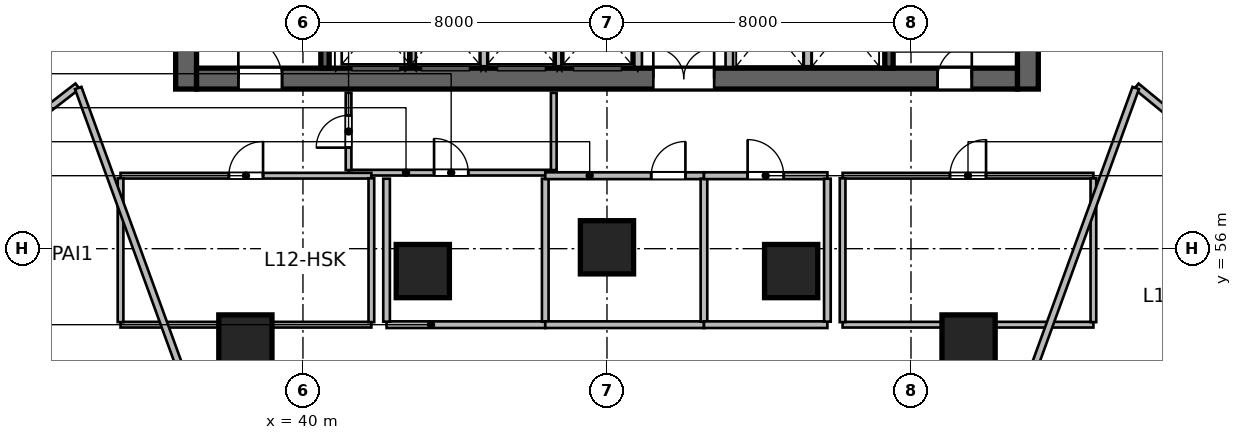
"""IFC4 building model, lengths in metres.
Left out: names, types, materials, properties, quantities, classifications, styles, units other than length and angle.
Written with IfcOpenShell. Run it as: python <this file> out.ifc"""

import sys

from ifc_helpers import new_model, si_unit, direction, frame, frame_2d, origin, origin_2d, place, context, subcontext, project, spatial, rectangle, circle, extrude, source, transform, mapped, element, fill, save


model = new_model("IFC4")
c1 = context("Model", 3, precision=1e-05, world=origin(), true_north=direction((0.0, 1.0)))
c2 = subcontext(c1, "Body", "Model", "MODEL_VIEW")
j1 = project(units=[si_unit("LENGTHUNIT", "METRE"), si_unit("PLANEANGLEUNIT", "RADIAN")], contexts=[c1])
p1 = place(None, origin())
s1 = spatial("IfcSite", under=j1, at=p1, CompositionType="ELEMENT")
p2 = place(p1, origin())
s2 = spatial("IfcBuilding", under=s1, at=p2, CompositionType="ELEMENT")
p3 = place(p2, frame((0.0, 0.0, 57.0)))
s3 = spatial("IfcBuildingStorey", under=s2, at=p3, CompositionType="ELEMENT", Elevation=57.0)
m1 = source(origin(), c2, "Body", "SweptSolid", [
    extrude(rectangle(XDim=12.0, YDim=0.55, at=frame_2d((6.0, 0.0))), origin(), (0.0, 0.0, 1.0), 3.6),
])
for number, where, z_axis, x_axis in (
    (1, (36.925, 60.2, 0.0), (0.0, 0.0, 1.0), (0.0, 1.0, 0.0)),
    (2, (59.075, 60.2, 0.0), (0.0, 0.0, 1.0), (0.0, 1.0, 0.0)),
):
    element("IfcWall", number, at=place(p3, frame(where, z_axis=z_axis, x_axis=x_axis)), inside=s3, PredefinedType="SHEAR", context=c2, shape_type="MappedRepresentation", body=[
        mapped(m1, transform((0.0, 0.0, 0.0), scale=1.0)),
    ])
m2 = source(origin(), c2, "Body", "SweptSolid", [
    extrude(rectangle(XDim=21.6, YDim=0.55, at=frame_2d((10.8, 0.0))), origin(), (0.0, 0.0, 1.0), 3.6),
])
p4 = place(p3, frame((37.2, 60.475, 0.0), z_axis=(0.0, 0.0, 1.0), x_axis=(1.0, 0.0, 0.0)))
e3 = element("IfcWall", 3, at=p4, inside=s3, PredefinedType="SHEAR", context=c2, shape_type="MappedRepresentation", body=[
    mapped(m2, transform((0.0, 0.0, 0.0), scale=1.0)),
])
p5 = place(p4, frame((1.1, 0.0, 0.0)))
e4 = element("IfcOpeningElement", 4, at=p5, cuts=e3, PredefinedType="OPENING", context=c2, shape_type="SweptSolid", body=[
    extrude(rectangle(XDim=1.15, YDim=2.15, at=frame_2d((0.575, 1.075))), frame((0.0, 0.285, 0.0), z_axis=(0.0, -1.0, 0.0), x_axis=(1.0, 0.0, 0.0)), (0.0, 0.0, 1.0), 0.57),
])
p6 = place(p4, frame((19.5, 0.0, 0.0)))
e5 = element("IfcOpeningElement", 5, at=p6, cuts=e3, PredefinedType="OPENING", context=c2, shape_type="SweptSolid", body=[
    extrude(rectangle(XDim=0.9, YDim=2.1, at=frame_2d((0.45, 1.05))), frame((0.0, 0.285, 0.0), z_axis=(0.0, -1.0, 0.0), x_axis=(1.0, 0.0, 0.0)), (0.0, 0.0, 1.0), 0.57),
])
p7 = place(p4, frame((12.02, 0.0, 0.0)))
e6 = element("IfcOpeningElement", 6, at=p7, cuts=e3, PredefinedType="OPENING", context=c2, shape_type="SweptSolid", body=[
    extrude(rectangle(XDim=1.6, YDim=2.15, at=frame_2d((0.8, 1.075))), frame((0.0, 0.285, 0.0), z_axis=(0.0, -1.0, 0.0), x_axis=(1.0, 0.0, 0.0)), (0.0, 0.0, 1.0), 0.57),
])
m3 = source(origin(), c2, "Body", "SweptSolid", [
    extrude(rectangle(XDim=10.9, YDim=0.22, at=frame_2d((5.45, 0.0))), origin(), (0.0, 0.0, 1.0), 3.6),
])
p8 = place(p3, frame((40.58, 60.75, 0.0), z_axis=(0.0, 0.0, 1.0), x_axis=(0.0, 1.0, 0.0)))
e7 = element("IfcWall", 7, at=p8, inside=s3, PredefinedType="SHEAR", context=c2, shape_type="MappedRepresentation", body=[
    mapped(m3, transform((0.0, 0.0, 0.0), scale=1.0)),
])
p9 = place(p3, frame((55.42, 60.75, 0.0), z_axis=(0.0, 0.0, 1.0), x_axis=(0.0, 1.0, 0.0)))
e8 = element("IfcWall", 8, at=p9, inside=s3, PredefinedType="SHEAR", context=c2, shape_type="MappedRepresentation", body=[
    mapped(m3, transform((0.0, 0.0, 0.0), scale=1.0)),
])
p10 = place(p9, frame((9.495, 0.0, 0.0)))
e9 = element("IfcOpeningElement", 9, at=p10, cuts=e8, PredefinedType="OPENING", context=c2, shape_type="SweptSolid", body=[
    extrude(rectangle(XDim=1.15, YDim=2.15, at=frame_2d((0.575, 1.075))), frame((0.0, 0.12, 0.0), z_axis=(0.0, -1.0, 0.0), x_axis=(1.0, 0.0, 0.0)), (0.0, 0.0, 1.0), 0.24),
])
m4 = source(origin(), c2, "Body", "SweptSolid", [
    extrude(circle(Radius=0.7, at=origin_2d()), origin(), (0.0, 0.0, 1.0), 3.6),
])
for number, where, z_axis, x_axis in (
    (10, (38.485, 53.558, 0.0), (0.0, 0.0, 1.0), (-0.289, 0.957, 0.0)),
    (11, (43.154, 55.411, 0.0), (0.0, 0.0, 1.0), (-0.143, 0.99, 0.0)),
    (12, (48.0, 56.036, 0.0), (0.0, 0.0, 1.0), (0.0, 1.0, 0.0)),
    (13, (52.846, 55.411, 0.0), (0.0, 0.0, 1.0), (0.143, 0.99, 0.0)),
    (14, (57.515, 53.558, 0.0), (0.0, 0.0, 1.0), (0.289, 0.957, 0.0)),
):
    element("IfcColumn", number, at=place(p3, frame(where, z_axis=z_axis, x_axis=x_axis)), inside=s3, PredefinedType="COLUMN", context=c2, shape_type="MappedRepresentation", body=[
        mapped(m4, transform((0.0, 0.0, 0.0), scale=1.0)),
    ])
m5 = source(origin(), c2, "Body", "SweptSolid", [
    extrude(rectangle(XDim=2.24, YDim=0.2, at=frame_2d((1.12, 0.0))), origin(), (0.0, 0.0, 1.0), 3.36),
])
for number, where, z_axis, x_axis in (
    (15, (48.82, 60.78, 0.0), (0.0, 0.0, 1.0), (0.0, 1.0, 0.0)),
    (16, (51.22, 60.78, 0.0), (0.0, 0.0, 1.0), (0.0, 1.0, 0.0)),
):
    element("IfcWall", number, at=place(p3, frame(where, z_axis=z_axis, x_axis=x_axis)), inside=s3, PredefinedType="SOLIDWALL", context=c2, shape_type="MappedRepresentation", body=[
        mapped(m5, transform((0.0, 0.0, 0.0), scale=1.0)),
    ])
m6 = source(origin(), c2, "Body", "SweptSolid", [
    extrude(rectangle(XDim=2.2, YDim=0.2, at=frame_2d((1.1, 0.0))), origin(), (0.0, 0.0, 1.0), 3.36),
])
for number, where, z_axis, x_axis in (
    (17, (42.87, 60.8, 0.0), (0.0, 0.0, 1.0), (0.0, 1.0, 0.0)),
    (18, (44.77, 60.8, 0.0), (0.0, 0.0, 1.0), (0.0, 1.0, 0.0)),
    (19, (46.7, 60.8, 0.0), (0.0, 0.0, 1.0), (0.0, 1.0, 0.0)),
    (20, (53.28, 60.8, 0.0), (0.0, 0.0, 1.0), (0.0, 1.0, 0.0)),
):
    element("IfcWall", number, at=place(p3, frame(where, z_axis=z_axis, x_axis=x_axis)), inside=s3, PredefinedType="SOLIDWALL", context=c2, shape_type="MappedRepresentation", body=[
        mapped(m6, transform((0.0, 0.0, 0.0), scale=1.0)),
    ])
m7 = source(origin(), c2, "Body", "SweptSolid", [
    extrude(rectangle(XDim=5.4, YDim=0.15, at=frame_2d((2.7, 0.0))), origin(), (0.0, 0.0, 1.0), 3.36),
])
p11 = place(p3, frame((41.2, 58.0, 0.0), z_axis=(0.0, 0.0, 1.0), x_axis=(1.0, 0.0, 0.0)))
e21 = element("IfcWall", 21, at=p11, inside=s3, PredefinedType="PARTITIONING", context=c2, shape_type="MappedRepresentation", body=[
    mapped(m7, transform((0.0, 0.0, 0.0), scale=1.0)),
])
p12 = place(p11, frame((2.25, 0.0, 0.0)))
e22 = element("IfcOpeningElement", 22, at=p12, cuts=e21, PredefinedType="OPENING", context=c2, shape_type="SweptSolid", body=[
    extrude(rectangle(XDim=0.9, YDim=2.08, at=frame_2d((0.45, 1.04))), frame((0.0, 0.085, 0.0), z_axis=(0.0, -1.0, 0.0), x_axis=(1.0, 0.0, 0.0)), (0.0, 0.0, 1.0), 0.17),
])
m8 = source(origin(), c2, "Body", "SweptSolid", [
    extrude(rectangle(XDim=2.033, YDim=0.15, at=frame_2d((1.016, 0.0))), origin(), (0.0, 0.0, 1.0), 3.36),
])
p13 = place(p3, frame((41.2, 58.067, 0.0), z_axis=(0.0, 0.0, 1.0), x_axis=(0.0, 1.0, 0.0)))
e23 = element("IfcWall", 23, at=p13, inside=s3, PredefinedType="PARTITIONING", context=c2, shape_type="MappedRepresentation", body=[
    mapped(m8, transform((0.0, 0.0, 0.0), scale=1.0)),
])
p14 = place(p13, frame((0.591, 0.0, 0.0)))
e24 = element("IfcOpeningElement", 24, at=p14, cuts=e23, PredefinedType="OPENING", context=c2, shape_type="SweptSolid", body=[
    extrude(rectangle(XDim=0.85, YDim=2.1, at=frame_2d((0.425, 1.05))), frame((0.0, 0.085, 0.0), z_axis=(0.0, -1.0, 0.0), x_axis=(1.0, 0.0, 0.0)), (0.0, 0.0, 1.0), 0.17),
])
p15 = place(p3, frame((46.6, 58.067, 0.0), z_axis=(0.0, 0.0, 1.0), x_axis=(0.0, 1.0, 0.0)))
e25 = element("IfcWall", 25, at=p15, inside=s3, PredefinedType="PARTITIONING", context=c2, shape_type="MappedRepresentation", body=[
    mapped(m8, transform((0.0, 0.0, 0.0), scale=1.0)),
])
m9 = source(origin(), c2, "Body", "SweptSolid", [
    extrude(rectangle(XDim=6.6, YDim=0.15, at=frame_2d((3.3, 0.0))), origin(), (0.0, 0.0, 1.0), 2.803),
])
p16 = place(p3, frame((35.2, 54.0, 0.0), z_axis=(0.0, 0.0, 1.0), x_axis=(1.0, 0.0, 0.0)))
e26 = element("IfcWall", 26, at=p16, inside=s3, PredefinedType="PARTITIONING", context=c2, shape_type="MappedRepresentation", body=[
    mapped(m9, transform((0.0, 0.0, 0.0), scale=1.0)),
])
m10 = source(origin(), c2, "Body", "SweptSolid", [
    extrude(rectangle(XDim=6.6, YDim=0.15, at=frame_2d((3.3, 0.0))), origin(), (0.0, 0.0, 1.0), 3.36),
])
p17 = place(p3, frame((35.2, 57.92, 0.0), z_axis=(0.0, 0.0, 1.0), x_axis=(1.0, 0.0, 0.0)))
e27 = element("IfcWall", 27, at=p17, inside=s3, PredefinedType="PARTITIONING", context=c2, shape_type="MappedRepresentation", body=[
    mapped(m10, transform((0.0, 0.0, 0.0), scale=1.0)),
])
p18 = place(p17, frame((2.85, 0.0, 0.0)))
e28 = element("IfcOpeningElement", 28, at=p18, cuts=e27, PredefinedType="OPENING", context=c2, shape_type="SweptSolid", body=[
    extrude(rectangle(XDim=0.9, YDim=2.1, at=frame_2d((0.45, 1.05))), frame((0.0, 0.085, 0.0), z_axis=(0.0, -1.0, 0.0), x_axis=(1.0, 0.0, 0.0)), (0.0, 0.0, 1.0), 0.17),
])
m11 = source(origin(), c2, "Body", "SweptSolid", [
    extrude(rectangle(XDim=3.785, YDim=0.15, at=frame_2d((1.893, 0.0))), origin(), (0.0, 0.0, 1.0), 3.36),
])
for number, where, z_axis, x_axis in (
    (29, (35.2, 54.067, 0.0), (0.0, 0.0, 1.0), (0.0, 1.0, 0.0)),
    (30, (41.8, 54.067, 0.0), (0.0, 0.0, 1.0), (0.0, 1.0, 0.0)),
):
    element("IfcWall", number, at=place(p3, frame(where, z_axis=z_axis, x_axis=x_axis)), inside=s3, PredefinedType="PARTITIONING", context=c2, shape_type="MappedRepresentation", body=[
        mapped(m11, transform((0.0, 0.0, 0.0), scale=1.0)),
    ])
m12 = source(origin(), c2, "Body", "SweptSolid", [
    extrude(rectangle(XDim=4.176, YDim=0.175, at=frame_2d((2.088, 0.0))), origin(), (0.0, 0.0, 1.0), 3.36),
])
p19 = place(p3, frame((42.2, 54.0, 0.0), z_axis=(0.0, 0.0, 1.0), x_axis=(1.0, 0.0, 0.0)))
e31 = element("IfcWall", 31, at=p19, inside=s3, PredefinedType="PARTITIONING", context=c2, shape_type="MappedRepresentation", body=[
    mapped(m12, transform((0.0, 0.0, 0.0), scale=1.0)),
])
m13 = source(origin(), c2, "Body", "SweptSolid", [
    extrude(rectangle(XDim=3.763, YDim=0.175, at=frame_2d((1.881, 0.0))), origin(), (0.0, 0.0, 1.0), 3.36),
])
for number, where, z_axis, x_axis in (
    (32, (42.2, 54.079, 0.0), (0.0, 0.0, 1.0), (0.0, 1.0, 0.0)),
    (33, (46.376, 54.079, 0.0), (0.0, 0.0, 1.0), (0.0, 1.0, 0.0)),
):
    element("IfcWall", number, at=place(p3, frame(where, z_axis=z_axis, x_axis=x_axis)), inside=s3, PredefinedType="PARTITIONING", context=c2, shape_type="MappedRepresentation", body=[
        mapped(m13, transform((0.0, 0.0, 0.0), scale=1.0)),
    ])
p20 = place(p3, frame((46.376, 54.0, 0.0), z_axis=(0.0, 0.0, 1.0), x_axis=(1.0, 0.0, 0.0)))
e34 = element("IfcWall", 34, at=p20, inside=s3, PredefinedType="PARTITIONING", context=c2, shape_type="MappedRepresentation", body=[
    mapped(m12, transform((0.0, 0.0, 0.0), scale=1.0)),
])
m14 = source(origin(), c2, "Body", "SweptSolid", [
    extrude(rectangle(XDim=4.176, YDim=0.18, at=frame_2d((2.088, 0.0))), origin(), (0.0, 0.0, 1.0), 3.36),
])
p21 = place(p3, frame((46.376, 57.92, 0.0), z_axis=(0.0, 0.0, 1.0), x_axis=(1.0, 0.0, 0.0)))
e35 = element("IfcWall", 35, at=p21, inside=s3, PredefinedType="PLUMBINGWALL", context=c2, shape_type="MappedRepresentation", body=[
    mapped(m14, transform((0.0, 0.0, 0.0), scale=1.0)),
])
p22 = place(p21, frame((2.788, 0.0, 0.0)))
e36 = element("IfcOpeningElement", 36, at=p22, cuts=e35, PredefinedType="OPENING", context=c2, shape_type="SweptSolid", body=[
    extrude(rectangle(XDim=0.9, YDim=2.08, at=frame_2d((0.45, 1.04))), frame((0.0, 0.1, 0.0), z_axis=(0.0, -1.0, 0.0), x_axis=(1.0, 0.0, 0.0)), (0.0, 0.0, 1.0), 0.2),
])
p23 = place(p3, frame((50.552, 54.079, 0.0), z_axis=(0.0, 0.0, 1.0), x_axis=(0.0, 1.0, 0.0)))
e37 = element("IfcWall", 37, at=p23, inside=s3, PredefinedType="PARTITIONING", context=c2, shape_type="MappedRepresentation", body=[
    mapped(m13, transform((0.0, 0.0, 0.0), scale=1.0)),
])
m15 = source(origin(), c2, "Body", "SweptSolid", [
    extrude(rectangle(XDim=3.248, YDim=0.175, at=frame_2d((1.624, 0.0))), origin(), (0.0, 0.0, 1.0), 3.36),
])
p24 = place(p3, frame((50.552, 54.0, 0.0), z_axis=(0.0, 0.0, 1.0), x_axis=(1.0, 0.0, 0.0)))
e38 = element("IfcWall", 38, at=p24, inside=s3, PredefinedType="PARTITIONING", context=c2, shape_type="MappedRepresentation", body=[
    mapped(m15, transform((0.0, 0.0, 0.0), scale=1.0)),
])
m16 = source(origin(), c2, "Body", "SweptSolid", [
    extrude(rectangle(XDim=3.248, YDim=0.18, at=frame_2d((1.624, 0.0))), origin(), (0.0, 0.0, 1.0), 3.36),
])
p25 = place(p3, frame((50.552, 57.92, 0.0), z_axis=(0.0, 0.0, 1.0), x_axis=(1.0, 0.0, 0.0)))
e39 = element("IfcWall", 39, at=p25, inside=s3, PredefinedType="PLUMBINGWALL", context=c2, shape_type="MappedRepresentation", body=[
    mapped(m16, transform((0.0, 0.0, 0.0), scale=1.0)),
])
p26 = place(p25, frame((1.149, 0.0, 0.0)))
e40 = element("IfcOpeningElement", 40, at=p26, cuts=e39, PredefinedType="OPENING", context=c2, shape_type="SweptSolid", body=[
    extrude(rectangle(XDim=0.95, YDim=2.12, at=frame_2d((0.475, 1.06))), frame((0.0, 0.1, 0.0), z_axis=(0.0, -1.0, 0.0), x_axis=(1.0, 0.0, 0.0)), (0.0, 0.0, 1.0), 0.2),
])
p27 = place(p3, frame((53.8, 54.079, 0.0), z_axis=(0.0, 0.0, 1.0), x_axis=(0.0, 1.0, 0.0)))
e41 = element("IfcWall", 41, at=p27, inside=s3, PredefinedType="PARTITIONING", context=c2, shape_type="MappedRepresentation", body=[
    mapped(m13, transform((0.0, 0.0, 0.0), scale=1.0)),
])
p28 = place(p3, frame((54.2, 54.0, 0.0), z_axis=(0.0, 0.0, 1.0), x_axis=(1.0, 0.0, 0.0)))
e42 = element("IfcWall", 42, at=p28, inside=s3, PredefinedType="PARTITIONING", context=c2, shape_type="MappedRepresentation", body=[
    mapped(m9, transform((0.0, 0.0, 0.0), scale=1.0)),
])
p29 = place(p3, frame((54.2, 57.92, 0.0), z_axis=(0.0, 0.0, 1.0), x_axis=(1.0, 0.0, 0.0)))
e43 = element("IfcWall", 43, at=p29, inside=s3, PredefinedType="PARTITIONING", context=c2, shape_type="MappedRepresentation", body=[
    mapped(m10, transform((0.0, 0.0, 0.0), scale=1.0)),
])
p30 = place(p29, frame((2.825, 0.0, 0.0)))
e44 = element("IfcOpeningElement", 44, at=p30, cuts=e43, PredefinedType="OPENING", context=c2, shape_type="SweptSolid", body=[
    extrude(rectangle(XDim=0.95, YDim=2.1, at=frame_2d((0.475, 1.05))), frame((0.0, 0.085, 0.0), z_axis=(0.0, -1.0, 0.0), x_axis=(1.0, 0.0, 0.0)), (0.0, 0.0, 1.0), 0.17),
])
for number, where, z_axis, x_axis in (
    (45, (54.2, 54.067, 0.0), (0.0, 0.0, 1.0), (0.0, 1.0, 0.0)),
    (46, (60.8, 54.067, 0.0), (0.0, 0.0, 1.0), (0.0, 1.0, 0.0)),
):
    element("IfcWall", number, at=place(p3, frame(where, z_axis=z_axis, x_axis=x_axis)), inside=s3, PredefinedType="PARTITIONING", context=c2, shape_type="MappedRepresentation", body=[
        mapped(m11, transform((0.0, 0.0, 0.0), scale=1.0)),
    ])
m17 = source(origin(), c2, "Body", "SweptSolid", [
    extrude(rectangle(XDim=4.855, YDim=0.18, at=frame_2d((2.427, 0.0))), origin(), (0.0, 0.0, 1.0), 3.36),
])
p31 = place(p3, frame((30.229, 57.305, 0.0), z_axis=(0.0, 0.0, 1.0), x_axis=(0.790930965655, 0.611905391028, 0.0)))
e47 = element("IfcWall", 47, at=p31, inside=s3, PredefinedType="PLUMBINGWALL", context=c2, shape_type="MappedRepresentation", body=[
    mapped(m17, transform((0.0, 0.0, 0.0), scale=1.0)),
])
p32 = place(p31, frame((1.952, 0.0, 0.0)))
e48 = element("IfcOpeningElement", 48, at=p32, cuts=e47, PredefinedType="OPENING", context=c2, shape_type="SweptSolid", body=[
    extrude(rectangle(XDim=0.95, YDim=2.1, at=frame_2d((0.475, 1.05))), frame((0.0, 0.1, 0.0), z_axis=(0.0, -1.0, 0.0), x_axis=(1.0, 0.0, 0.0)), (0.0, 0.0, 1.0), 0.2),
])
m18 = source(origin(), c2, "Body", "SweptSolid", [
    extrude(rectangle(XDim=11.811, YDim=0.18, at=frame_2d((5.906, 0.0))), origin(), (0.0, 0.0, 1.0), 3.36),
])
p33 = place(p3, frame((35.562, 46.71, 0.0), z_axis=(0.0, 0.0, 1.0), x_axis=(-0.449626289102, 0.893216771086, 0.0)))
e49 = element("IfcWall", 49, at=p33, inside=s3, PredefinedType="PLUMBINGWALL", context=c2, shape_type="MappedRepresentation", body=[
    mapped(m18, transform((0.0, 0.0, 0.0), scale=1.0)),
])
m19 = source(origin(), c2, "Body", "SweptSolid", [
    extrude(rectangle(XDim=12.196, YDim=0.18, at=frame_2d((6.098, 0.0))), origin(), (0.0, 0.0, 1.0), 3.36),
])
p34 = place(p3, frame((38.258, 48.766, 0.0), z_axis=(0.0, 0.0, 1.0), x_axis=(-0.342022711534, 0.939691686031, 0.0)))
e50 = element("IfcWall", 50, at=p34, inside=s3, PredefinedType="PLUMBINGWALL", context=c2, shape_type="MappedRepresentation", body=[
    mapped(m19, transform((0.0, 0.0, 0.0), scale=1.0)),
])
m20 = source(origin(), c2, "Body", "SweptSolid", [
    extrude(rectangle(XDim=6.721, YDim=0.18, at=frame_2d((3.361, 0.0))), origin(), (0.0, 0.0, 1.0), 3.36),
])
p35 = place(p3, frame((61.931, 60.275, 0.0), z_axis=(0.0, 0.0, 1.0), x_axis=(0.772828051199, -0.63461547671, 0.0)))
e51 = element("IfcWall", 51, at=p35, inside=s3, PredefinedType="PLUMBINGWALL", context=c2, shape_type="MappedRepresentation", body=[
    mapped(m20, transform((0.0, 0.0, 0.0), scale=1.0)),
])
p36 = place(p35, frame((2.885, 0.0, 0.0)))
e52 = element("IfcOpeningElement", 52, at=p36, cuts=e51, PredefinedType="OPENING", context=c2, shape_type="SweptSolid", body=[
    extrude(rectangle(XDim=0.95, YDim=2.15, at=frame_2d((0.475, 1.075))), frame((0.0, 0.1, 0.0), z_axis=(0.0, -1.0, 0.0), x_axis=(1.0, 0.0, 0.0)), (0.0, 0.0, 1.0), 0.2),
])
p37 = place(p3, frame((57.742, 48.766, 0.0), z_axis=(0.0, 0.0, 1.0), x_axis=(0.342022711534, 0.939691686031, 0.0)))
e53 = element("IfcWall", 53, at=p37, inside=s3, PredefinedType="PLUMBINGWALL", context=c2, shape_type="MappedRepresentation", body=[
    mapped(m19, transform((0.0, 0.0, 0.0), scale=1.0)),
])
m21 = source(origin(), c2, "Body", "SweptSolid", [
    extrude(rectangle(XDim=11.67, YDim=0.18, at=frame_2d((5.835, 0.0))), origin(), (0.0, 0.0, 1.0), 3.36),
])
p38 = place(p3, frame((61.381, 45.795, 0.0), z_axis=(0.0, 0.0, 1.0), x_axis=(0.490156946222, 0.871634193954, 0.0)))
e54 = element("IfcWall", 54, at=p38, inside=s3, PredefinedType="PLUMBINGWALL", context=c2, shape_type="MappedRepresentation", body=[
    mapped(m21, transform((0.0, 0.0, 0.0), scale=1.0)),
])
m22 = source(origin(), c2, "Body", "SweptSolid", [
    extrude(rectangle(XDim=1.15, YDim=2.15, at=frame_2d((0.575, 1.075))), frame((0.0, 0.025, 0.0), z_axis=(0.0, -1.0, 0.0), x_axis=(1.0, 0.0, 0.0)), (0.0, 0.0, 1.0), 0.05),
])
p39 = place(p5, origin())
e55 = element("IfcDoor", 55, at=p39, inside=s3, OperationType="SINGLE_SWING_LEFT", PredefinedType="DOOR", context=c2, shape_type="MappedRepresentation", body=[
    mapped(m22, transform((0.0, 0.0, 0.0), scale=1.0)),
])
fill(e4, e55)
m23 = source(origin(), c2, "Body", "SweptSolid", [
    extrude(rectangle(XDim=0.9, YDim=2.1, at=frame_2d((0.45, 1.05))), frame((0.0, 0.025, 0.0), z_axis=(0.0, -1.0, 0.0), x_axis=(1.0, 0.0, 0.0)), (0.0, 0.0, 1.0), 0.05),
])
p40 = place(p6, origin())
e56 = element("IfcDoor", 56, at=p40, inside=s3, OperationType="SINGLE_SWING_RIGHT", PredefinedType="DOOR", context=c2, shape_type="MappedRepresentation", body=[
    mapped(m23, transform((0.0, 0.0, 0.0), scale=1.0)),
])
fill(e5, e56)
m24 = source(origin(), c2, "Body", "SweptSolid", [
    extrude(rectangle(XDim=1.6, YDim=2.15, at=frame_2d((0.8, 1.075))), frame((0.0, 0.025, 0.0), z_axis=(0.0, -1.0, 0.0), x_axis=(1.0, 0.0, 0.0)), (0.0, 0.0, 1.0), 0.05),
])
p41 = place(p7, origin())
e57 = element("IfcDoor", 57, at=p41, inside=s3, OperationType="DOUBLE_DOOR_SINGLE_SWING", PredefinedType="DOOR", context=c2, shape_type="MappedRepresentation", body=[
    mapped(m24, transform((0.0, 0.0, 0.0), scale=1.0)),
])
fill(e6, e57)
m25 = source(origin(), c2, "Body", "SweptSolid", [
    extrude(rectangle(XDim=0.85, YDim=2.1, at=frame_2d((0.425, 1.05))), frame((0.0, 0.025, 0.0), z_axis=(0.0, -1.0, 0.0), x_axis=(1.0, 0.0, 0.0)), (0.0, 0.0, 1.0), 0.05),
])
p42 = place(p14, origin())
e58 = element("IfcDoor", 58, at=p42, inside=s3, OperationType="SINGLE_SWING_LEFT", PredefinedType="DOOR", context=c2, shape_type="MappedRepresentation", body=[
    mapped(m25, transform((0.0, 0.0, 0.0), scale=1.0)),
])
fill(e24, e58)
p43 = place(p18, origin())
e59 = element("IfcDoor", 59, at=p43, inside=s3, OperationType="SINGLE_SWING_RIGHT", PredefinedType="DOOR", context=c2, shape_type="MappedRepresentation", body=[
    mapped(m23, transform((0.0, 0.0, 0.0), scale=1.0)),
])
fill(e28, e59)
m26 = source(origin(), c2, "Body", "SweptSolid", [
    extrude(rectangle(XDim=0.9, YDim=2.08, at=frame_2d((0.45, 1.04))), frame((0.0, 0.025, 0.0), z_axis=(0.0, -1.0, 0.0), x_axis=(1.0, 0.0, 0.0)), (0.0, 0.0, 1.0), 0.05),
])
p44 = place(p12, origin())
e60 = element("IfcDoor", 60, at=p44, inside=s3, OperationType="SINGLE_SWING_LEFT", PredefinedType="DOOR", context=c2, shape_type="MappedRepresentation", body=[
    mapped(m26, transform((0.0, 0.0, 0.0), scale=1.0)),
])
fill(e22, e60)
p45 = place(p22, origin())
e61 = element("IfcDoor", 61, at=p45, inside=s3, OperationType="SINGLE_SWING_RIGHT", PredefinedType="DOOR", context=c2, shape_type="MappedRepresentation", body=[
    mapped(m26, transform((0.0, 0.0, 0.0), scale=1.0)),
])
fill(e36, e61)
m27 = source(origin(), c2, "Body", "SweptSolid", [
    extrude(rectangle(XDim=0.95, YDim=2.12, at=frame_2d((0.475, 1.06))), frame((0.0, 0.025, 0.0), z_axis=(0.0, -1.0, 0.0), x_axis=(1.0, 0.0, 0.0)), (0.0, 0.0, 1.0), 0.05),
])
p46 = place(p26, origin())
e62 = element("IfcDoor", 62, at=p46, inside=s3, OperationType="SINGLE_SWING_LEFT", PredefinedType="DOOR", context=c2, shape_type="MappedRepresentation", body=[
    mapped(m27, transform((0.0, 0.0, 0.0), scale=1.0)),
])
fill(e40, e62)
m28 = source(origin(), c2, "Body", "SweptSolid", [
    extrude(rectangle(XDim=0.95, YDim=2.1, at=frame_2d((0.475, 1.05))), frame((0.0, 0.025, 0.0), z_axis=(0.0, -1.0, 0.0), x_axis=(1.0, 0.0, 0.0)), (0.0, 0.0, 1.0), 0.05),
])
p47 = place(p30, origin())
e63 = element("IfcDoor", 63, at=p47, inside=s3, OperationType="SINGLE_SWING_RIGHT", PredefinedType="DOOR", context=c2, shape_type="MappedRepresentation", body=[
    mapped(m28, transform((0.0, 0.0, 0.0), scale=1.0)),
])
fill(e44, e63)
save(model, sys.argv[1])
